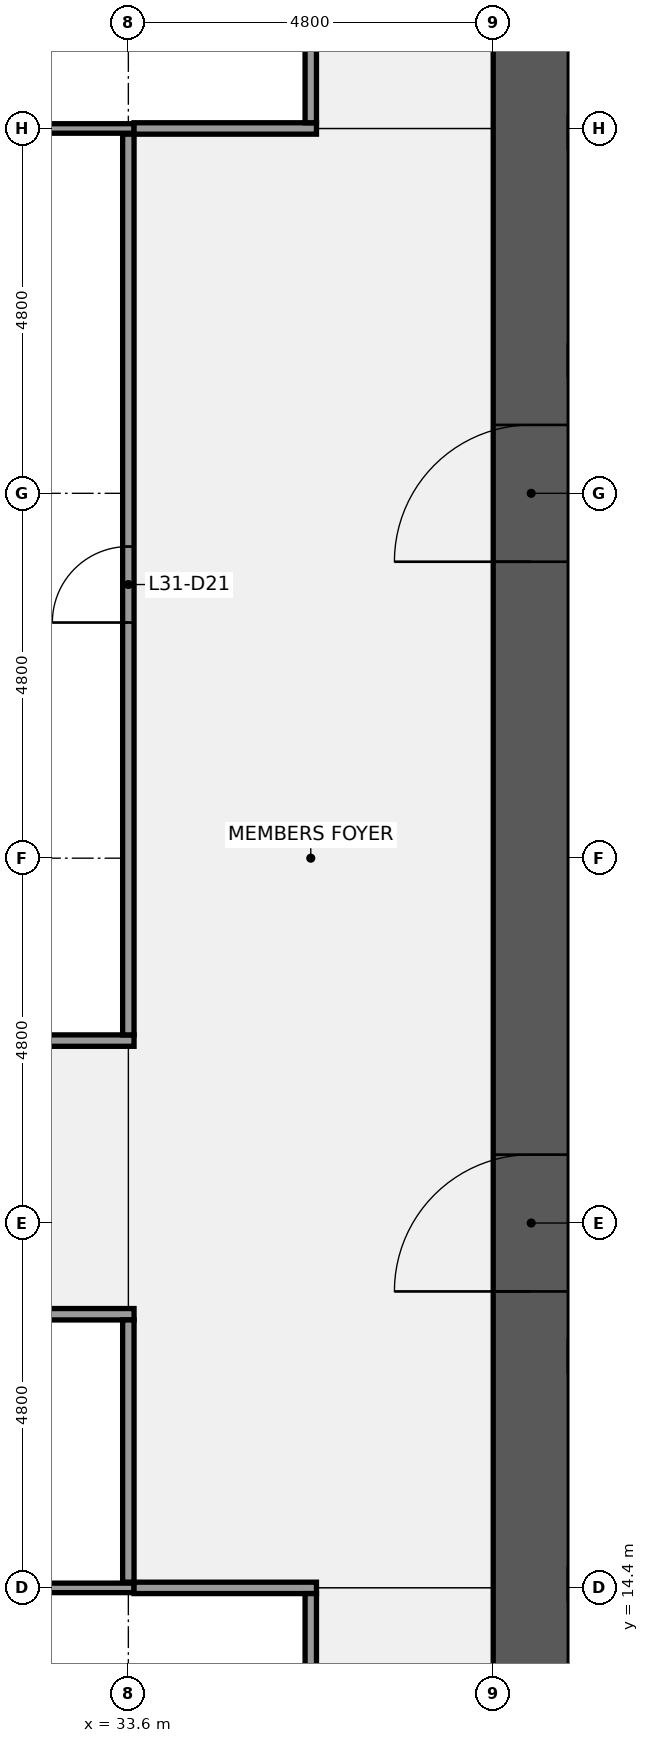
"""IFC4 building model, lengths in metres.
Left out: names, types, materials, properties, quantities, classifications, styles, units other than length and angle.
Written with IfcOpenShell. Run it as: python <this file> out.ifc"""

import sys

from ifc_helpers import new_model, si_unit, direction, frame, frame_2d, origin, place, context, subcontext, project, spatial, rectangle, extrude, element, fill, save


model = new_model("IFC4")
c1 = context("Model", 3, precision=1e-05, world=origin(), true_north=direction((0.0, 1.0)))
c2 = subcontext(c1, "Body", "Model", "MODEL_VIEW")
j1 = project(units=[si_unit("LENGTHUNIT", "METRE"), si_unit("PLANEANGLEUNIT", "RADIAN")], contexts=[c1])
p1 = place(None, origin())
s1 = spatial("IfcSite", under=j1, at=p1, CompositionType="ELEMENT")
p2 = place(p1, origin())
s2 = spatial("IfcBuilding", under=s1, at=p2, CompositionType="ELEMENT")
p3 = place(p2, frame((0.0, 0.0, 144.1)))
s3 = spatial("IfcBuildingStorey", under=s2, at=p3, CompositionType="ELEMENT", Elevation=144.1)
p4 = place(p3, frame((38.9, 9.6, 0.0), z_axis=(0.0, 0.0, 1.0), x_axis=(0.0, 1.0, 0.0)))
e1 = element("IfcWall", 1, at=p4, inside=s3, PredefinedType="SHEAR", context=c2, shape_type="SweptSolid", body=[
    extrude(rectangle(XDim=28.8, YDim=1.0, at=frame_2d((14.4, 0.0))), origin(), (0.0, 0.0, 1.0), 3.84),
])
p5 = place(p4, frame((8.7, 0.0, 0.0)))
e2 = element("IfcOpeningElement", 2, at=p5, cuts=e1, PredefinedType="OPENING", context=c2, shape_type="SweptSolid", body=[
    extrude(rectangle(XDim=1.8, YDim=2.1, at=frame_2d((0.9, 1.05))), frame((0.0, 0.51, 0.0), z_axis=(0.0, -1.0, 0.0), x_axis=(1.0, 0.0, 0.0)), (0.0, 0.0, 1.0), 1.02),
])
p6 = place(p4, frame((18.3, 0.0, 0.0)))
e3 = element("IfcOpeningElement", 3, at=p6, cuts=e1, PredefinedType="OPENING", context=c2, shape_type="SweptSolid", body=[
    extrude(rectangle(XDim=1.8, YDim=2.1, at=frame_2d((0.9, 1.05))), frame((0.0, 0.51, 0.0), z_axis=(0.0, -1.0, 0.0), x_axis=(1.0, 0.0, 0.0)), (0.0, 0.0, 1.0), 1.02),
])
p7 = place(p3, frame((24.075, 14.4, 0.0), z_axis=(0.0, 0.0, 1.0), x_axis=(1.0, 0.0, 0.0)))
e4 = element("IfcWall", 4, at=p7, inside=s3, PredefinedType="PARTITIONING", context=c2, shape_type="SweptSolid", body=[
    extrude(rectangle(XDim=9.6, YDim=0.125, at=frame_2d((4.8, 0.0))), origin(), (0.0, 0.0, 1.0), 2.936),
])
p8 = place(p3, frame((33.675, 14.4, 0.0), z_axis=(0.0, 0.0, 1.0), x_axis=(1.0, 0.0, 0.0)))
e5 = element("IfcWall", 5, at=p8, inside=s3, PredefinedType="PARTITIONING", context=c2, shape_type="SweptSolid", body=[
    extrude(rectangle(XDim=2.4, YDim=0.15, at=frame_2d((1.2, 0.0))), origin(), (0.0, 0.0, 1.0), 2.936),
])
p9 = place(p3, frame((23.925, 18.0, 0.0), z_axis=(0.0, 0.0, 1.0), x_axis=(1.0, 0.0, 0.0)))
e6 = element("IfcWall", 6, at=p9, inside=s3, PredefinedType="PARTITIONING", context=c2, shape_type="SweptSolid", body=[
    extrude(rectangle(XDim=9.75, YDim=0.15, at=frame_2d((4.875, 0.0))), origin(), (0.0, 0.0, 1.0), 2.936),
])
p10 = place(p9, frame((1.375, 0.0, 0.0)))
e7 = element("IfcOpeningElement", 7, at=p10, cuts=e6, PredefinedType="OPENING", context=c2, shape_type="SweptSolid", body=[
    extrude(rectangle(XDim=1.0, YDim=2.1, at=frame_2d((0.5, 1.05))), frame((0.0, 0.085, 0.0), z_axis=(0.0, -1.0, 0.0), x_axis=(1.0, 0.0, 0.0)), (0.0, 0.0, 1.0), 0.17),
])
p11 = place(p9, frame((6.175, 0.0, 0.0)))
e8 = element("IfcOpeningElement", 8, at=p11, cuts=e6, PredefinedType="OPENING", context=c2, shape_type="SweptSolid", body=[
    extrude(rectangle(XDim=1.0, YDim=2.1, at=frame_2d((0.5, 1.05))), frame((0.0, 0.085, 0.0), z_axis=(0.0, -1.0, 0.0), x_axis=(1.0, 0.0, 0.0)), (0.0, 0.0, 1.0), 0.17),
])
p12 = place(p3, frame((23.925, 21.6, 0.0), z_axis=(0.0, 0.0, 1.0), x_axis=(1.0, 0.0, 0.0)))
e9 = element("IfcWall", 9, at=p12, inside=s3, PredefinedType="PARTITIONING", context=c2, shape_type="SweptSolid", body=[
    extrude(rectangle(XDim=9.75, YDim=0.15, at=frame_2d((4.875, 0.0))), origin(), (0.0, 0.0, 1.0), 2.936),
])
p13 = place(p3, frame((24.075, 33.6, 0.0), z_axis=(0.0, 0.0, 1.0), x_axis=(1.0, 0.0, 0.0)))
e10 = element("IfcWall", 10, at=p13, inside=s3, PredefinedType="PARTITIONING", context=c2, shape_type="SweptSolid", body=[
    extrude(rectangle(XDim=9.6, YDim=0.125, at=frame_2d((4.8, 0.0))), origin(), (0.0, 0.0, 1.0), 2.936),
])
p14 = place(p3, frame((33.675, 33.6, 0.0), z_axis=(0.0, 0.0, 1.0), x_axis=(1.0, 0.0, 0.0)))
e11 = element("IfcWall", 11, at=p14, inside=s3, PredefinedType="PARTITIONING", context=c2, shape_type="SweptSolid", body=[
    extrude(rectangle(XDim=2.4, YDim=0.15, at=frame_2d((1.2, 0.0))), origin(), (0.0, 0.0, 1.0), 2.936),
])
p15 = place(p3, frame((33.6, 14.475, 0.0), z_axis=(0.0, 0.0, 1.0), x_axis=(0.0, 1.0, 0.0)))
e12 = element("IfcWall", 12, at=p15, inside=s3, PredefinedType="PARTITIONING", context=c2, shape_type="SweptSolid", body=[
    extrude(rectangle(XDim=3.45, YDim=0.15, at=frame_2d((1.725, 0.0))), origin(), (0.0, 0.0, 1.0), 2.936),
])
p16 = place(p3, frame((33.6, 21.675, 0.0), z_axis=(0.0, 0.0, 1.0), x_axis=(0.0, 1.0, 0.0)))
e13 = element("IfcWall", 13, at=p16, inside=s3, PredefinedType="PARTITIONING", context=c2, shape_type="SweptSolid", body=[
    extrude(rectangle(XDim=11.85, YDim=0.15, at=frame_2d((5.925, 0.0))), origin(), (0.0, 0.0, 1.0), 2.936),
])
p17 = place(p16, frame((5.425, 0.0, 0.0)))
e14 = element("IfcOpeningElement", 14, at=p17, cuts=e13, PredefinedType="OPENING", context=c2, shape_type="SweptSolid", body=[
    extrude(rectangle(XDim=1.0, YDim=2.1, at=frame_2d((0.5, 1.05))), frame((0.0, 0.085, 0.0), z_axis=(0.0, -1.0, 0.0), x_axis=(1.0, 0.0, 0.0)), (0.0, 0.0, 1.0), 0.17),
])
for number, where, z_axis, x_axis in (
    (15, (36.0, 9.675, 0.0), (0.0, 0.0, 1.0), (0.0, 1.0, 0.0)),
    (16, (36.0, 33.675, 0.0), (0.0, 0.0, 1.0), (0.0, 1.0, 0.0)),
):
    element("IfcWall", number, at=place(p3, frame(where, z_axis=z_axis, x_axis=x_axis)), inside=s3, PredefinedType="PARTITIONING", context=c2, shape_type="SweptSolid", body=[
        extrude(rectangle(XDim=4.65, YDim=0.15, at=frame_2d((2.325, 0.0))), origin(), (0.0, 0.0, 1.0), 2.936),
    ])
p18 = place(p5, origin())
e17 = element("IfcDoor", 17, at=p18, inside=s3, OperationType="DOUBLE_DOOR_SINGLE_SWING", PredefinedType="DOOR", context=c2, shape_type="SweptSolid", body=[
    extrude(rectangle(XDim=1.8, YDim=2.1, at=frame_2d((0.9, 1.05))), frame((0.0, 0.025, 0.0), z_axis=(0.0, -1.0, 0.0), x_axis=(1.0, 0.0, 0.0)), (0.0, 0.0, 1.0), 0.05),
])
fill(e2, e17)
p19 = place(p6, origin())
e18 = element("IfcDoor", 18, at=p19, inside=s3, OperationType="DOUBLE_DOOR_SINGLE_SWING", PredefinedType="DOOR", context=c2, shape_type="SweptSolid", body=[
    extrude(rectangle(XDim=1.8, YDim=2.1, at=frame_2d((0.9, 1.05))), frame((0.0, 0.025, 0.0), z_axis=(0.0, -1.0, 0.0), x_axis=(1.0, 0.0, 0.0)), (0.0, 0.0, 1.0), 0.05),
])
fill(e3, e18)
p20 = place(p17, origin())
e19 = element("IfcDoor", 19, at=p20, inside=s3, OperationType="SINGLE_SWING_LEFT", PredefinedType="DOOR", context=c2, shape_type="SweptSolid", body=[
    extrude(rectangle(XDim=1.0, YDim=2.1, at=frame_2d((0.5, 1.05))), frame((0.0, 0.025, 0.0), z_axis=(0.0, -1.0, 0.0), x_axis=(1.0, 0.0, 0.0)), (0.0, 0.0, 1.0), 0.05),
])
fill(e14, e19)
save(model, sys.argv[1])
